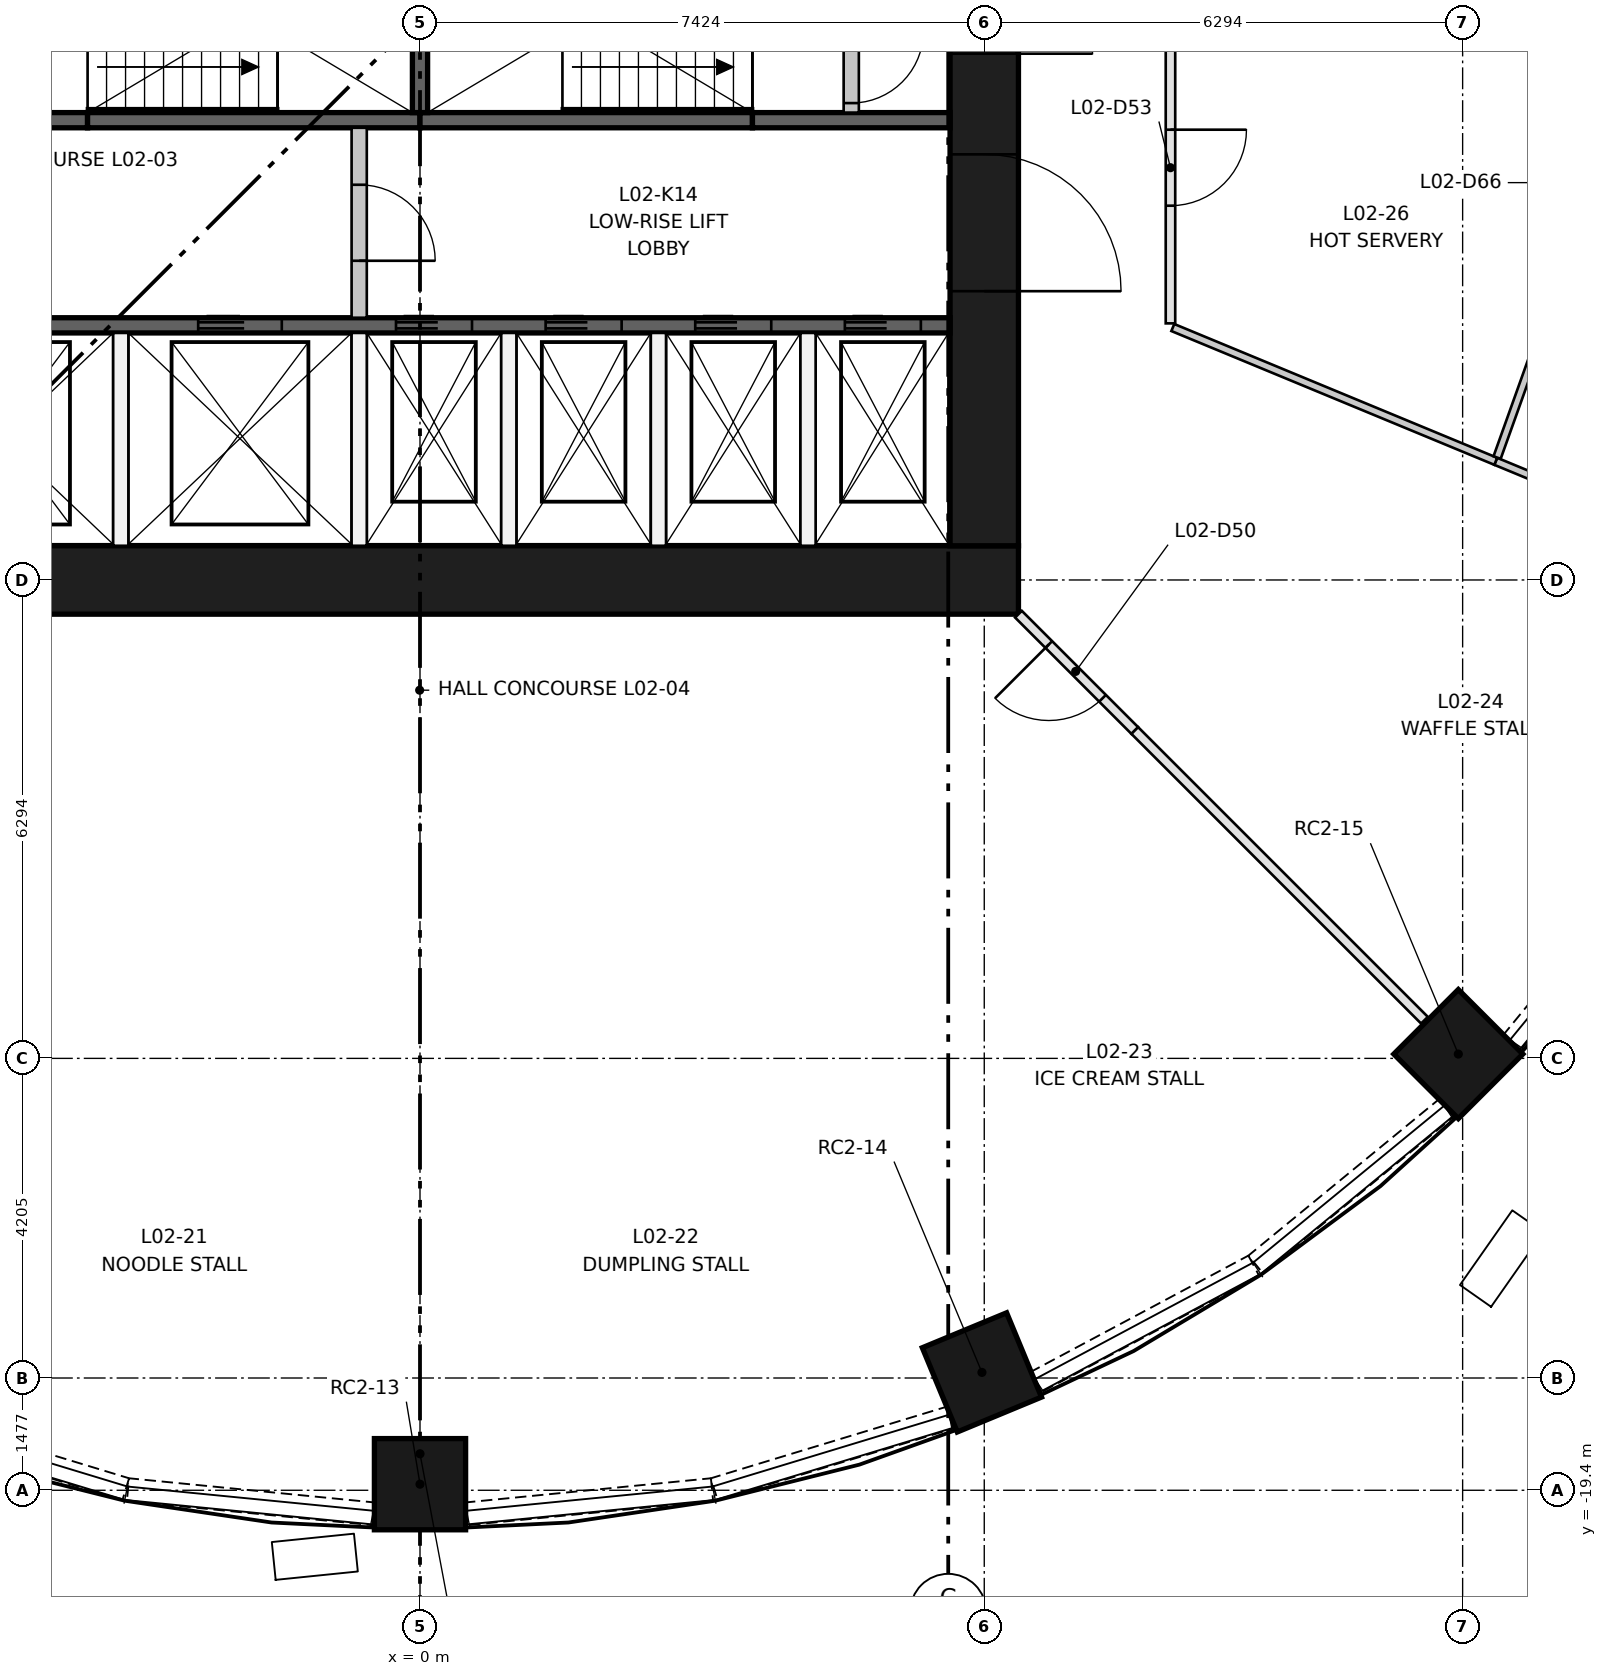
"""IFC4 building model, lengths in metres.
Left out: names, types, materials, properties, quantities, classifications, styles, units other than length and angle.
Written with IfcOpenShell. Run it as: python <this file> out.ifc"""

import sys

from ifc_helpers import new_model, si_unit, direction, frame, frame_2d, origin, origin_2d, place, context, subcontext, project, spatial, rectangle, extrude, element, fill, save


model = new_model("IFC4")
c1 = context("Model", 3, precision=1e-05, world=origin(), true_north=direction((0.0, 1.0)))
c2 = subcontext(c1, "Body", "Model", "MODEL_VIEW")
j1 = project(units=[si_unit("LENGTHUNIT", "METRE"), si_unit("PLANEANGLEUNIT", "RADIAN")], contexts=[c1])
p1 = place(None, origin())
s1 = spatial("IfcSite", under=j1, at=p1, CompositionType="ELEMENT")
p2 = place(p1, origin())
s2 = spatial("IfcBuilding", under=s1, at=p2, CompositionType="ELEMENT")
p3 = place(p2, frame((0.0, 0.0, 9.9)))
s3 = spatial("IfcBuildingStorey", under=s2, at=p3, CompositionType="ELEMENT", Elevation=9.9)
for number, where, z_axis, x_axis in (
    (1, (0.0, -19.32, 0.0), (0.0, 0.0, 1.0), (0.0, -1.0, 0.0)),
    (2, (7.394, -17.849, 0.0), (0.0, 0.0, 1.0), (0.383, -0.924, 0.0)),
    (3, (13.661, -13.661, 0.0), (0.0, 0.0, 1.0), (0.707, -0.707, 0.0)),
):
    element("IfcColumn", number, at=place(p3, frame(where, z_axis=z_axis, x_axis=x_axis)), inside=s3, PredefinedType="COLUMN", context=c2, shape_type="SweptSolid", body=[
        extrude(rectangle(XDim=1.2, YDim=1.2, at=origin_2d()), origin(), (0.0, 0.0, 1.0), 4.5),
    ])
p4 = place(p3, frame((-7.874, -7.424, 0.0), z_axis=(0.0, 0.0, 1.0), x_axis=(1.0, 0.0, 0.0)))
e4 = element("IfcWall", 4, at=p4, inside=s3, PredefinedType="SHEAR", context=c2, shape_type="SweptSolid", body=[
    extrude(rectangle(XDim=15.748, YDim=0.9, at=frame_2d((7.874, 0.0))), origin(), (0.0, 0.0, 1.0), 4.5),
])
p5 = place(p3, frame((7.424, -6.974, 0.0), z_axis=(0.0, 0.0, 1.0), x_axis=(0.0, 1.0, 0.0)))
e5 = element("IfcWall", 5, at=p5, inside=s3, PredefinedType="SHEAR", context=c2, shape_type="SweptSolid", body=[
    extrude(rectangle(XDim=13.948, YDim=0.9, at=frame_2d((6.974, 0.0))), origin(), (0.0, 0.0, 1.0), 4.5),
])
p6 = place(p5, frame((6.474, 0.0, 0.0)))
e6 = element("IfcOpeningElement", 6, at=p6, cuts=e5, PredefinedType="OPENING", context=c2, shape_type="SweptSolid", body=[
    extrude(rectangle(XDim=1.0, YDim=2.1, at=frame_2d((0.5, 1.05))), frame((0.0, 0.46, 0.0), z_axis=(0.0, -1.0, 0.0), x_axis=(1.0, 0.0, 0.0)), (0.0, 0.0, 1.0), 0.92),
])
p7 = place(p5, frame((3.35, 0.0, 0.0)))
e7 = element("IfcOpeningElement", 7, at=p7, cuts=e5, PredefinedType="OPENING", context=c2, shape_type="SweptSolid", body=[
    extrude(rectangle(XDim=1.8, YDim=2.1, at=frame_2d((0.9, 1.05))), frame((0.0, 0.46, 0.0), z_axis=(0.0, -1.0, 0.0), x_axis=(1.0, 0.0, 0.0)), (0.0, 0.0, 1.0), 0.92),
])
p8 = place(p5, frame((8.799, 0.0, 0.0)))
e8 = element("IfcOpeningElement", 8, at=p8, cuts=e5, PredefinedType="OPENING", context=c2, shape_type="SweptSolid", body=[
    extrude(rectangle(XDim=1.8, YDim=2.1, at=frame_2d((0.9, 1.05))), frame((0.0, 0.46, 0.0), z_axis=(0.0, -1.0, 0.0), x_axis=(1.0, 0.0, 0.0)), (0.0, 0.0, 1.0), 0.92),
])
p9 = place(p3, frame((-6.974, -4.074, 0.0), z_axis=(0.0, 0.0, 1.0), x_axis=(1.0, 0.0, 0.0)))
e9 = element("IfcWall", 9, at=p9, inside=s3, PredefinedType="SHEAR", context=c2, shape_type="SweptSolid", body=[
    extrude(rectangle(XDim=13.948, YDim=0.2, at=frame_2d((6.974, 0.0))), origin(), (0.0, 0.0, 1.0), 4.1),
])
p10 = place(p9, frame((0.918, 0.0, 0.0)))
e10 = element("IfcOpeningElement", 10, at=p10, cuts=e9, PredefinedType="OPENING", context=c2, shape_type="SweptSolid", body=[
    extrude(rectangle(XDim=1.1, YDim=2.1, at=frame_2d((0.55, 1.05))), frame((0.0, 0.11, 0.0), z_axis=(0.0, -1.0, 0.0), x_axis=(1.0, 0.0, 0.0)), (0.0, 0.0, 1.0), 0.22),
])
p11 = place(p9, frame((4.055, 0.0, 0.0)))
e11 = element("IfcOpeningElement", 11, at=p11, cuts=e9, PredefinedType="OPENING", context=c2, shape_type="SweptSolid", body=[
    extrude(rectangle(XDim=1.1, YDim=2.1, at=frame_2d((0.55, 1.05))), frame((0.0, 0.11, 0.0), z_axis=(0.0, -1.0, 0.0), x_axis=(1.0, 0.0, 0.0)), (0.0, 0.0, 1.0), 0.22),
])
p12 = place(p9, frame((6.658, 0.0, 0.0)))
e12 = element("IfcOpeningElement", 12, at=p12, cuts=e9, PredefinedType="OPENING", context=c2, shape_type="SweptSolid", body=[
    extrude(rectangle(XDim=1.0, YDim=2.1, at=frame_2d((0.5, 1.05))), frame((0.0, 0.11, 0.0), z_axis=(0.0, -1.0, 0.0), x_axis=(1.0, 0.0, 0.0)), (0.0, 0.0, 1.0), 0.22),
])
p13 = place(p9, frame((8.627, 0.0, 0.0)))
e13 = element("IfcOpeningElement", 13, at=p13, cuts=e9, PredefinedType="OPENING", context=c2, shape_type="SweptSolid", body=[
    extrude(rectangle(XDim=1.0, YDim=2.1, at=frame_2d((0.5, 1.05))), frame((0.0, 0.11, 0.0), z_axis=(0.0, -1.0, 0.0), x_axis=(1.0, 0.0, 0.0)), (0.0, 0.0, 1.0), 0.22),
])
p14 = place(p9, frame((10.595, 0.0, 0.0)))
e14 = element("IfcOpeningElement", 14, at=p14, cuts=e9, PredefinedType="OPENING", context=c2, shape_type="SweptSolid", body=[
    extrude(rectangle(XDim=1.0, YDim=2.1, at=frame_2d((0.5, 1.05))), frame((0.0, 0.11, 0.0), z_axis=(0.0, -1.0, 0.0), x_axis=(1.0, 0.0, 0.0)), (0.0, 0.0, 1.0), 0.22),
])
p15 = place(p9, frame((12.564, 0.0, 0.0)))
e15 = element("IfcOpeningElement", 15, at=p15, cuts=e9, PredefinedType="OPENING", context=c2, shape_type="SweptSolid", body=[
    extrude(rectangle(XDim=1.0, YDim=2.1, at=frame_2d((0.5, 1.05))), frame((0.0, 0.11, 0.0), z_axis=(0.0, -1.0, 0.0), x_axis=(1.0, 0.0, 0.0)), (0.0, 0.0, 1.0), 0.22),
])
p16 = place(p3, frame((-6.974, -1.375, 0.0), z_axis=(0.0, 0.0, 1.0), x_axis=(1.0, 0.0, 0.0)))
e16 = element("IfcWall", 16, at=p16, inside=s3, PredefinedType="SHEAR", context=c2, shape_type="SweptSolid", body=[
    extrude(rectangle(XDim=2.6, YDim=0.2, at=frame_2d((1.3, 0.0))), origin(), (0.0, 0.0, 1.0), 4.1),
])
for number, where, z_axis, x_axis in (
    (17, (-4.374, -1.375, 0.0), (0.0, 0.0, 1.0), (1.0, 0.0, 0.0)),
    (18, (0.0, -1.375, 0.0), (0.0, 0.0, 1.0), (1.0, 0.0, 0.0)),
):
    element("IfcWall", number, at=place(p3, frame(where, z_axis=z_axis, x_axis=x_axis)), inside=s3, PredefinedType="SHEAR", context=c2, shape_type="SweptSolid", body=[
        extrude(rectangle(XDim=4.374, YDim=0.2, at=frame_2d((2.187, 0.0))), origin(), (0.0, 0.0, 1.0), 4.1),
    ])
p17 = place(p3, frame((4.374, -1.375, 0.0), z_axis=(0.0, 0.0, 1.0), x_axis=(1.0, 0.0, 0.0)))
e19 = element("IfcWall", 19, at=p17, inside=s3, PredefinedType="SHEAR", context=c2, shape_type="SweptSolid", body=[
    extrude(rectangle(XDim=2.6, YDim=0.2, at=frame_2d((1.3, 0.0))), origin(), (0.0, 0.0, 1.0), 4.1),
])
p18 = place(p3, frame((0.0, -1.275, 0.0), z_axis=(0.0, 0.0, 1.0), x_axis=(0.0, 1.0, 0.0)))
e20 = element("IfcWall", 20, at=p18, inside=s3, PredefinedType="SHEAR", context=c2, shape_type="SweptSolid", body=[
    extrude(rectangle(XDim=2.55, YDim=0.2, at=frame_2d((1.275, 0.0))), origin(), (0.0, 0.0, 1.0), 4.1),
])
for number, where, z_axis, x_axis in (
    (21, (-3.937, -6.974, 0.0), (0.0, 0.0, 1.0), (0.0, 1.0, 0.0)),
    (22, (-0.8, -6.974, 0.0), (0.0, 0.0, 1.0), (0.0, 1.0, 0.0)),
):
    element("IfcWall", number, at=place(p3, frame(where, z_axis=z_axis, x_axis=x_axis)), inside=s3, PredefinedType="PARTITIONING", context=c2, shape_type="SweptSolid", body=[
        extrude(rectangle(XDim=2.8, YDim=0.2, at=frame_2d((1.4, 0.0))), origin(), (0.0, 0.0, 1.0), 4.1),
    ])
p19 = place(p3, frame((-0.8, -3.974, 0.0), z_axis=(0.0, 0.0, 1.0), x_axis=(0.0, 1.0, 0.0)))
e23 = element("IfcWall", 23, at=p19, inside=s3, PredefinedType="PARTITIONING", context=c2, shape_type="SweptSolid", body=[
    extrude(rectangle(XDim=2.499, YDim=0.2, at=frame_2d((1.25, 0.0))), origin(), (0.0, 0.0, 1.0), 4.1),
])
p20 = place(p19, frame((0.75, 0.0, 0.0)))
e24 = element("IfcOpeningElement", 24, at=p20, cuts=e23, PredefinedType="OPENING", context=c2, shape_type="SweptSolid", body=[
    extrude(rectangle(XDim=1.0, YDim=2.1, at=frame_2d((0.5, 1.05))), frame((0.0, 0.11, 0.0), z_axis=(0.0, -1.0, 0.0), x_axis=(1.0, 0.0, 0.0)), (0.0, 0.0, 1.0), 0.22),
])
for number, where, z_axis, x_axis in (
    (25, (1.168, -6.974, 0.0), (0.0, 0.0, 1.0), (0.0, 1.0, 0.0)),
    (26, (3.137, -6.974, 0.0), (0.0, 0.0, 1.0), (0.0, 1.0, 0.0)),
    (27, (5.105, -6.974, 0.0), (0.0, 0.0, 1.0), (0.0, 1.0, 0.0)),
):
    element("IfcWall", number, at=place(p3, frame(where, z_axis=z_axis, x_axis=x_axis)), inside=s3, PredefinedType="PARTITIONING", context=c2, shape_type="SweptSolid", body=[
        extrude(rectangle(XDim=2.8, YDim=0.2, at=frame_2d((1.4, 0.0))), origin(), (0.0, 0.0, 1.0), 4.1),
    ])
p21 = place(p3, frame((5.674, -1.275, 0.0), z_axis=(0.0, 0.0, 1.0), x_axis=(0.0, 1.0, 0.0)))
e28 = element("IfcWall", 28, at=p21, inside=s3, PredefinedType="PARTITIONING", context=c2, shape_type="SweptSolid", body=[
    extrude(rectangle(XDim=2.55, YDim=0.2, at=frame_2d((1.275, 0.0))), origin(), (0.0, 0.0, 1.0), 4.1),
])
p22 = place(p21, frame((0.125, 0.0, 0.0)))
e29 = element("IfcOpeningElement", 29, at=p22, cuts=e28, PredefinedType="OPENING", context=c2, shape_type="SweptSolid", body=[
    extrude(rectangle(XDim=0.95, YDim=2.1, at=frame_2d((0.475, 1.05))), frame((0.0, 0.11, 0.0), z_axis=(0.0, -1.0, 0.0), x_axis=(1.0, 0.0, 0.0)), (0.0, 0.0, 1.0), 0.22),
])
p23 = place(p21, frame((1.475, 0.0, 0.0)))
e30 = element("IfcOpeningElement", 30, at=p23, cuts=e28, PredefinedType="OPENING", context=c2, shape_type="SweptSolid", body=[
    extrude(rectangle(XDim=0.95, YDim=2.1, at=frame_2d((0.475, 1.05))), frame((0.0, 0.11, 0.0), z_axis=(0.0, -1.0, 0.0), x_axis=(1.0, 0.0, 0.0)), (0.0, 0.0, 1.0), 0.22),
])
p24 = place(p3, frame((-6.976, -18.443, 0.0), z_axis=(0.0, 0.0, 1.0), x_axis=(0.95689962518, -0.290418848098, 0.0)))
e31 = element("IfcWall", 31, at=p24, inside=s3, PredefinedType="SOLIDWALL", context=c2, shape_type="SweptSolid", body=[
    extrude(rectangle(XDim=3.244, YDim=0.3, at=frame_2d((1.622, 0.0))), origin(), (0.0, 0.0, 1.0), 0.45),
])
for number, where, z_axis, x_axis in (
    (32, (-3.842, -19.392, 0.0), (0.0, 0.0, 1.0), (0.995, -0.098, 0.0)),
    (33, (0.613, -19.709, 0.0), (0.0, 0.0, 1.0), (0.995, 0.098, 0.0)),
):
    element("IfcWall", number, at=place(p3, frame(where, z_axis=z_axis, x_axis=x_axis)), inside=s3, PredefinedType="SOLIDWALL", context=c2, shape_type="SweptSolid", body=[
        extrude(rectangle(XDim=3.245, YDim=0.3, at=frame_2d((1.623, 0.0))), origin(), (0.0, 0.0, 1.0), 0.45),
    ])
p25 = place(p3, frame((3.871, -19.385, 0.0), z_axis=(0.0, 0.0, 1.0), x_axis=(0.95689962518, 0.290418848098, 0.0)))
e34 = element("IfcWall", 34, at=p25, inside=s3, PredefinedType="SOLIDWALL", context=c2, shape_type="SweptSolid", body=[
    extrude(rectangle(XDim=3.244, YDim=0.3, at=frame_2d((1.622, 0.0))), origin(), (0.0, 0.0, 1.0), 0.45),
])
p26 = place(p3, frame((8.108, -17.974, 0.0), z_axis=(0.0, 0.0, 1.0), x_axis=(0.882015257196, 0.471220846392, 0.0)))
e35 = element("IfcWall", 35, at=p26, inside=s3, PredefinedType="SOLIDWALL", context=c2, shape_type="SweptSolid", body=[
    extrude(rectangle(XDim=3.244, YDim=0.3, at=frame_2d((1.622, 0.0))), origin(), (0.0, 0.0, 1.0), 0.45),
])
for number, where, z_axis, x_axis in (
    (36, (10.995, -16.428, 0.0), (0.0, 0.0, 1.0), (0.773, 0.634, 0.0)),
    (37, (14.371, -13.503, 0.0), (0.0, 0.0, 1.0), (0.634, 0.773, 0.0)),
):
    element("IfcWall", number, at=place(p3, frame(where, z_axis=z_axis, x_axis=x_axis)), inside=s3, PredefinedType="SOLIDWALL", context=c2, shape_type="SweptSolid", body=[
        extrude(rectangle(XDim=3.245, YDim=0.3, at=frame_2d((1.623, 0.0))), origin(), (0.0, 0.0, 1.0), 0.45),
    ])
p27 = place(p3, frame((9.405, -9.405, 0.0), z_axis=(0.0, 0.0, 1.0), x_axis=(-0.707106781187, 0.707106781187, 0.0)))
e38 = element("IfcWall", 38, at=p27, inside=s3, PredefinedType="PARTITIONING", context=c2, shape_type="SweptSolid", body=[
    extrude(rectangle(XDim=2.165, YDim=0.125, at=frame_2d((1.082, 0.0))), origin(), (0.0, 0.0, 1.0), 4.1),
])
p28 = place(p27, frame((0.6, 0.0, 0.0)))
e39 = element("IfcOpeningElement", 39, at=p28, cuts=e38, PredefinedType="OPENING", context=c2, shape_type="SweptSolid", body=[
    extrude(rectangle(XDim=1.0, YDim=2.1, at=frame_2d((0.5, 1.05))), frame((0.0, 0.073, 0.0), z_axis=(0.0, -1.0, 0.0), x_axis=(1.0, 0.0, 0.0)), (0.0, 0.0, 1.0), 0.145),
])
p29 = place(p3, frame((9.874, 0.0, 0.0), z_axis=(0.0, 0.0, 1.0), x_axis=(0.0, -1.0, 0.0)))
e40 = element("IfcWall", 40, at=p29, inside=s3, PredefinedType="PARTITIONING", context=c2, shape_type="SweptSolid", body=[
    extrude(rectangle(XDim=4.048, YDim=0.125, at=frame_2d((2.024, 0.0))), origin(), (0.0, 0.0, 1.0), 4.1),
])
p30 = place(p29, frame((1.5, 0.0, 0.0)))
e41 = element("IfcOpeningElement", 41, at=p30, cuts=e40, PredefinedType="OPENING", context=c2, shape_type="SweptSolid", body=[
    extrude(rectangle(XDim=1.0, YDim=2.1, at=frame_2d((0.5, 1.05))), frame((0.0, 0.073, 0.0), z_axis=(0.0, -1.0, 0.0), x_axis=(1.0, 0.0, 0.0)), (0.0, 0.0, 1.0), 0.145),
])
p31 = place(p3, frame((9.405, -9.405, 0.0), z_axis=(0.0, 0.0, 1.0), x_axis=(0.707106781187, -0.707106781187, 0.0)))
e42 = element("IfcWall", 42, at=p31, inside=s3, PredefinedType="PARTITIONING", context=c2, shape_type="SweptSolid", body=[
    extrude(rectangle(XDim=5.39, YDim=0.125, at=frame_2d((2.695, 0.0))), origin(), (0.0, 0.0, 1.0), 4.1),
])
p32 = place(p3, frame((14.154, -5.863, 0.0), z_axis=(0.0, 0.0, 1.0), x_axis=(0.923891456562, -0.382654643892, 0.0)))
e43 = element("IfcWall", 43, at=p32, inside=s3, PredefinedType="PARTITIONING", context=c2, shape_type="SweptSolid", body=[
    extrude(rectangle(XDim=3.37, YDim=0.1, at=frame_2d((1.685, 0.0))), origin(), (0.0, 0.0, 1.0), 4.1),
])
p33 = place(p3, frame((9.905, -4.103, 0.0), z_axis=(0.0, 0.0, 1.0), x_axis=(0.923879022759, -0.382684663013, 0.0)))
e44 = element("IfcWall", 44, at=p33, inside=s3, PredefinedType="PARTITIONING", context=c2, shape_type="SweptSolid", body=[
    extrude(rectangle(XDim=4.599, YDim=0.1, at=frame_2d((2.3, 0.0))), origin(), (0.0, 0.0, 1.0), 4.1),
])
p34 = place(p3, frame((14.171, -5.813, 0.0), z_axis=(0.0, 0.0, 1.0), x_axis=(0.336934267235, 0.941528172474, 0.0)))
e45 = element("IfcWall", 45, at=p34, inside=s3, PredefinedType="PARTITIONING", context=c2, shape_type="SweptSolid", body=[
    extrude(rectangle(XDim=1.448, YDim=0.1, at=frame_2d((0.724, 0.0))), origin(), (0.0, 0.0, 1.0), 4.1),
])
p35 = place(p11, origin())
e46 = element("IfcDoor", 46, at=p35, inside=s3, OperationType="DOUBLE_DOOR_SLIDING", PredefinedType="DOOR", context=c2, shape_type="SweptSolid", body=[
    extrude(rectangle(XDim=1.1, YDim=2.1, at=frame_2d((0.55, 1.05))), frame((0.0, 0.025, 0.0), z_axis=(0.0, -1.0, 0.0), x_axis=(1.0, 0.0, 0.0)), (0.0, 0.0, 1.0), 0.05),
])
fill(e11, e46)
p36 = place(p12, origin())
e47 = element("IfcDoor", 47, at=p36, inside=s3, OperationType="DOUBLE_DOOR_SLIDING", PredefinedType="DOOR", context=c2, shape_type="SweptSolid", body=[
    extrude(rectangle(XDim=1.0, YDim=2.1, at=frame_2d((0.5, 1.05))), frame((0.0, 0.025, 0.0), z_axis=(0.0, -1.0, 0.0), x_axis=(1.0, 0.0, 0.0)), (0.0, 0.0, 1.0), 0.05),
])
fill(e12, e47)
p37 = place(p13, origin())
e48 = element("IfcDoor", 48, at=p37, inside=s3, OperationType="DOUBLE_DOOR_SLIDING", PredefinedType="DOOR", context=c2, shape_type="SweptSolid", body=[
    extrude(rectangle(XDim=1.0, YDim=2.1, at=frame_2d((0.5, 1.05))), frame((0.0, 0.025, 0.0), z_axis=(0.0, -1.0, 0.0), x_axis=(1.0, 0.0, 0.0)), (0.0, 0.0, 1.0), 0.05),
])
fill(e13, e48)
p38 = place(p14, origin())
e49 = element("IfcDoor", 49, at=p38, inside=s3, OperationType="DOUBLE_DOOR_SLIDING", PredefinedType="DOOR", context=c2, shape_type="SweptSolid", body=[
    extrude(rectangle(XDim=1.0, YDim=2.1, at=frame_2d((0.5, 1.05))), frame((0.0, 0.025, 0.0), z_axis=(0.0, -1.0, 0.0), x_axis=(1.0, 0.0, 0.0)), (0.0, 0.0, 1.0), 0.05),
])
fill(e14, e49)
p39 = place(p15, origin())
e50 = element("IfcDoor", 50, at=p39, inside=s3, OperationType="DOUBLE_DOOR_SLIDING", PredefinedType="DOOR", context=c2, shape_type="SweptSolid", body=[
    extrude(rectangle(XDim=1.0, YDim=2.1, at=frame_2d((0.5, 1.05))), frame((0.0, 0.025, 0.0), z_axis=(0.0, -1.0, 0.0), x_axis=(1.0, 0.0, 0.0)), (0.0, 0.0, 1.0), 0.05),
])
fill(e15, e50)
p40 = place(p22, frame((0.95, 0.0, 0.0), z_axis=(0.0, 0.0, 1.0), x_axis=(-1.0, 0.0, 0.0)))
e51 = element("IfcDoor", 51, at=p40, inside=s3, OperationType="SINGLE_SWING_RIGHT", PredefinedType="DOOR", context=c2, shape_type="SweptSolid", body=[
    extrude(rectangle(XDim=0.95, YDim=2.1, at=frame_2d((0.475, 1.05))), frame((0.0, 0.025, 0.0), z_axis=(0.0, -1.0, 0.0), x_axis=(1.0, 0.0, 0.0)), (0.0, 0.0, 1.0), 0.05),
])
fill(e29, e51)
p41 = place(p20, frame((1.0, 0.0, 0.0), z_axis=(0.0, 0.0, 1.0), x_axis=(-1.0, 0.0, 0.0)))
e52 = element("IfcDoor", 52, at=p41, inside=s3, OperationType="SINGLE_SWING_LEFT", PredefinedType="DOOR", context=c2, shape_type="SweptSolid", body=[
    extrude(rectangle(XDim=1.0, YDim=2.1, at=frame_2d((0.5, 1.05))), frame((0.0, 0.025, 0.0), z_axis=(0.0, -1.0, 0.0), x_axis=(1.0, 0.0, 0.0)), (0.0, 0.0, 1.0), 0.05),
])
fill(e24, e52)
p42 = place(p6, frame((1.0, 0.0, 0.0), z_axis=(0.0, 0.0, 1.0), x_axis=(-1.0, 0.0, 0.0)))
e53 = element("IfcDoor", 53, at=p42, inside=s3, OperationType="SINGLE_SWING_LEFT", PredefinedType="DOOR", context=c2, shape_type="SweptSolid", body=[
    extrude(rectangle(XDim=1.0, YDim=2.1, at=frame_2d((0.5, 1.05))), frame((0.0, 0.45, 0.0), z_axis=(0.0, -1.0, 0.0), x_axis=(1.0, 0.0, 0.0)), (0.0, 0.0, 1.0), 0.05),
])
fill(e6, e53)
p43 = place(p7, frame((1.8, 0.0, 0.0), z_axis=(0.0, 0.0, 1.0), x_axis=(-1.0, 0.0, 0.0)))
e54 = element("IfcDoor", 54, at=p43, inside=s3, OperationType="DOUBLE_DOOR_SINGLE_SWING", PredefinedType="DOOR", context=c2, shape_type="SweptSolid", body=[
    extrude(rectangle(XDim=1.8, YDim=2.1, at=frame_2d((0.9, 1.05))), frame((0.0, 0.025, 0.0), z_axis=(0.0, -1.0, 0.0), x_axis=(1.0, 0.0, 0.0)), (0.0, 0.0, 1.0), 0.05),
])
fill(e7, e54)
p44 = place(p28, origin())
e55 = element("IfcDoor", 55, at=p44, inside=s3, OperationType="SINGLE_SWING_RIGHT", PredefinedType="DOOR", context=c2, shape_type="SweptSolid", body=[
    extrude(rectangle(XDim=1.0, YDim=2.1, at=frame_2d((0.5, 1.05))), frame((0.0, 0.025, 0.0), z_axis=(0.0, -1.0, 0.0), x_axis=(1.0, 0.0, 0.0)), (0.0, 0.0, 1.0), 0.05),
])
fill(e39, e55)
p45 = place(p30, origin())
e56 = element("IfcDoor", 56, at=p45, inside=s3, OperationType="SINGLE_SWING_LEFT", PredefinedType="DOOR", context=c2, shape_type="SweptSolid", body=[
    extrude(rectangle(XDim=1.0, YDim=2.1, at=frame_2d((0.5, 1.05))), frame((0.0, 0.025, 0.0), z_axis=(0.0, -1.0, 0.0), x_axis=(1.0, 0.0, 0.0)), (0.0, 0.0, 1.0), 0.05),
])
fill(e41, e56)
save(model, sys.argv[1])
